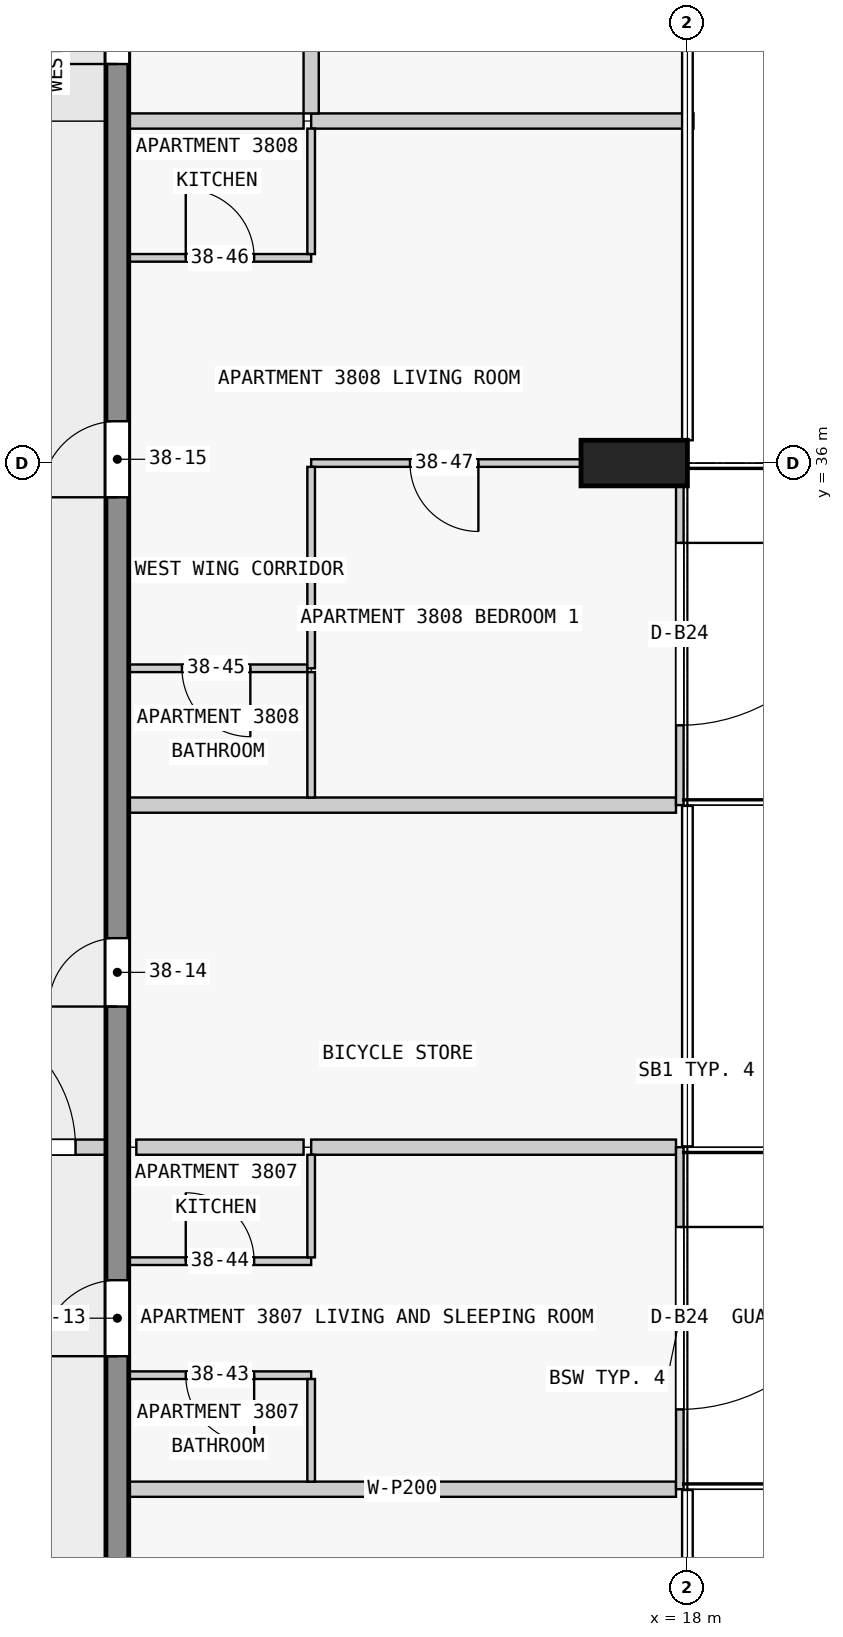
"""IFC4 building model, lengths in metres.
Left out: names, types, materials, properties, quantities, classifications, styles, units other than length and angle.
Written with IfcOpenShell. Run it as: python <this file> out.ifc"""

import sys

from ifc_helpers import new_model, si_unit, direction, frame, frame_2d, origin, origin_2d, place, context, subcontext, project, spatial, rectangle, extrude, element, fill, save


model = new_model("IFC4")
c1 = context("Model", 3, precision=1e-05, world=origin(), true_north=direction((0.0, 1.0)))
c2 = subcontext(c1, "Body", "Model", "MODEL_VIEW")
j1 = project(units=[si_unit("LENGTHUNIT", "METRE"), si_unit("PLANEANGLEUNIT", "RADIAN")], contexts=[c1])
p1 = place(None, origin())
s1 = spatial("IfcSite", under=j1, at=p1, CompositionType="ELEMENT")
p2 = place(p1, origin())
s2 = spatial("IfcBuilding", under=s1, at=p2, CompositionType="ELEMENT")
p3 = place(p2, frame((0.0, 0.0, 149.9)))
s3 = spatial("IfcBuildingStorey", under=s2, at=p3, CompositionType="ELEMENT", Elevation=149.9)
p4 = place(p3, frame((17.3, 36.0, 0.0), z_axis=(0.0, 0.0, 1.0), x_axis=(0.0, 1.0, 0.0)))
e1 = element("IfcColumn", 1, at=p4, inside=s3, PredefinedType="COLUMN", context=c2, shape_type="SweptSolid", body=[
    extrude(rectangle(XDim=0.6, YDim=1.4, at=origin_2d()), origin(), (0.0, 0.0, 1.0), 3.5),
])
p5 = place(p3, frame((10.5, 18.0, 0.0), z_axis=(0.0, 0.0, 1.0), x_axis=(0.0, 1.0, 0.0)))
e2 = element("IfcWall", 2, at=p5, inside=s3, PredefinedType="SHEAR", context=c2, shape_type="SweptSolid", body=[
    extrude(rectangle(XDim=27.0, YDim=0.3, at=frame_2d((13.5, 0.0))), origin(), (0.0, 0.0, 1.0), 3.25),
])
p6 = place(p5, frame((1.85, 0.0, 0.0)))
e3 = element("IfcOpeningElement", 3, at=p6, cuts=e2, PredefinedType="OPENING", context=c2, shape_type="SweptSolid", body=[
    extrude(rectangle(XDim=0.9, YDim=2.1, at=frame_2d((0.45, 1.05))), frame((0.0, 0.16, 0.0), z_axis=(0.0, -1.0, 0.0), x_axis=(1.0, 0.0, 0.0)), (0.0, 0.0, 1.0), 0.32),
])
p7 = place(p5, frame((6.25, 0.0, 0.0)))
e4 = element("IfcOpeningElement", 4, at=p7, cuts=e2, PredefinedType="OPENING", context=c2, shape_type="SweptSolid", body=[
    extrude(rectangle(XDim=1.0, YDim=2.1, at=frame_2d((0.5, 1.05))), frame((0.0, 0.16, 0.0), z_axis=(0.0, -1.0, 0.0), x_axis=(1.0, 0.0, 0.0)), (0.0, 0.0, 1.0), 0.32),
])
p8 = place(p5, frame((10.85, 0.0, 0.0)))
e5 = element("IfcOpeningElement", 5, at=p8, cuts=e2, PredefinedType="OPENING", context=c2, shape_type="SweptSolid", body=[
    extrude(rectangle(XDim=0.9, YDim=2.1, at=frame_2d((0.45, 1.05))), frame((0.0, 0.16, 0.0), z_axis=(0.0, -1.0, 0.0), x_axis=(1.0, 0.0, 0.0)), (0.0, 0.0, 1.0), 0.32),
])
p9 = place(p5, frame((17.55, 0.0, 0.0)))
e6 = element("IfcOpeningElement", 6, at=p9, cuts=e2, PredefinedType="OPENING", context=c2, shape_type="SweptSolid", body=[
    extrude(rectangle(XDim=1.0, YDim=2.1, at=frame_2d((0.5, 1.05))), frame((0.0, 0.16, 0.0), z_axis=(0.0, -1.0, 0.0), x_axis=(1.0, 0.0, 0.0)), (0.0, 0.0, 1.0), 0.32),
])
p10 = place(p5, frame((23.25, 0.0, 0.0)))
e7 = element("IfcOpeningElement", 7, at=p10, cuts=e2, PredefinedType="OPENING", context=c2, shape_type="SweptSolid", body=[
    extrude(rectangle(XDim=0.9, YDim=2.1, at=frame_2d((0.45, 1.05))), frame((0.0, 0.16, 0.0), z_axis=(0.0, -1.0, 0.0), x_axis=(1.0, 0.0, 0.0)), (0.0, 0.0, 1.0), 0.32),
])
p11 = place(p5, frame((25.45, 0.0, 0.0)))
e8 = element("IfcOpeningElement", 8, at=p11, cuts=e2, PredefinedType="OPENING", context=c2, shape_type="SweptSolid", body=[
    extrude(rectangle(XDim=1.0, YDim=2.1, at=frame_2d((0.5, 1.05))), frame((0.0, 0.16, 0.0), z_axis=(0.0, -1.0, 0.0), x_axis=(1.0, 0.0, 0.0)), (0.0, 0.0, 1.0), 0.32),
])
p12 = place(p3, frame((17.9, 27.0, 0.0), z_axis=(0.0, 0.0, 1.0), x_axis=(0.0, -1.0, 0.0)))
e9 = element("IfcWall", 9, at=p12, inside=s3, PredefinedType="STANDARD", context=c2, shape_type="SweptSolid", body=[
    extrude(rectangle(XDim=4.5, YDim=0.1, at=frame_2d((2.25, 0.0))), origin(), (0.0, 0.0, 1.0), 3.25),
])
p13 = place(p12, frame((1.05, 0.0, 0.0)))
e10 = element("IfcOpeningElement", 10, at=p13, cuts=e9, PredefinedType="OPENING", context=c2, shape_type="SweptSolid", body=[
    extrude(rectangle(XDim=2.4, YDim=2.4, at=frame_2d((1.2, 1.2))), frame((0.0, 0.06, 0.0), z_axis=(0.0, -1.0, 0.0), x_axis=(1.0, 0.0, 0.0)), (0.0, 0.0, 1.0), 0.12),
])
p14 = place(p3, frame((17.9, 36.0, 0.0), z_axis=(0.0, 0.0, 1.0), x_axis=(0.0, -1.0, 0.0)))
e11 = element("IfcWall", 11, at=p14, inside=s3, PredefinedType="STANDARD", context=c2, shape_type="SweptSolid", body=[
    extrude(rectangle(XDim=4.5, YDim=0.1, at=frame_2d((2.25, 0.0))), origin(), (0.0, 0.0, 1.0), 3.25),
])
p15 = place(p14, frame((1.05, 0.0, 0.0)))
e12 = element("IfcOpeningElement", 12, at=p15, cuts=e11, PredefinedType="OPENING", context=c2, shape_type="SweptSolid", body=[
    extrude(rectangle(XDim=2.4, YDim=2.4, at=frame_2d((1.2, 1.2))), frame((0.0, 0.06, 0.0), z_axis=(0.0, -1.0, 0.0), x_axis=(1.0, 0.0, 0.0)), (0.0, 0.0, 1.0), 0.12),
])
p16 = place(p3, frame((17.85, 22.5, 0.0), z_axis=(0.0, 0.0, 1.0), x_axis=(-1.0, 0.0, 0.0)))
e13 = element("IfcWall", 13, at=p16, inside=s3, PredefinedType="PARTITIONING", context=c2, shape_type="SweptSolid", body=[
    extrude(rectangle(XDim=7.2, YDim=0.2, at=frame_2d((3.6, 0.0))), origin(), (0.0, 0.0, 1.0), 3.25),
])
p17 = place(p3, frame((13.05, 24.0, 0.0), z_axis=(0.0, 0.0, 1.0), x_axis=(-1.0, 0.0, 0.0)))
e14 = element("IfcWall", 14, at=p17, inside=s3, PredefinedType="PARTITIONING", context=c2, shape_type="SweptSolid", body=[
    extrude(rectangle(XDim=2.4, YDim=0.1, at=frame_2d((1.2, 0.0))), origin(), (0.0, 0.0, 1.0), 3.25),
])
p18 = place(p17, frame((0.75, 0.0, 0.0)))
e15 = element("IfcOpeningElement", 15, at=p18, cuts=e14, PredefinedType="OPENING", context=c2, shape_type="SweptSolid", body=[
    extrude(rectangle(XDim=0.9, YDim=2.1, at=frame_2d((0.45, 1.05))), frame((0.0, 0.06, 0.0), z_axis=(0.0, -1.0, 0.0), x_axis=(1.0, 0.0, 0.0)), (0.0, 0.0, 1.0), 0.12),
])
p19 = place(p3, frame((10.65, 25.5, 0.0), z_axis=(0.0, 0.0, 1.0), x_axis=(1.0, 0.0, 0.0)))
e16 = element("IfcWall", 16, at=p19, inside=s3, PredefinedType="PARTITIONING", context=c2, shape_type="SweptSolid", body=[
    extrude(rectangle(XDim=2.4, YDim=0.1, at=frame_2d((1.2, 0.0))), origin(), (0.0, 0.0, 1.0), 3.25),
])
p20 = place(p19, frame((0.75, 0.0, 0.0)))
e17 = element("IfcOpeningElement", 17, at=p20, cuts=e16, PredefinedType="OPENING", context=c2, shape_type="SweptSolid", body=[
    extrude(rectangle(XDim=0.9, YDim=2.1, at=frame_2d((0.45, 1.05))), frame((0.0, 0.06, 0.0), z_axis=(0.0, -1.0, 0.0), x_axis=(1.0, 0.0, 0.0)), (0.0, 0.0, 1.0), 0.12),
])
p21 = place(p3, frame((12.95, 27.0, 0.0), z_axis=(0.0, 0.0, 1.0), x_axis=(-1.0, 0.0, 0.0)))
e18 = element("IfcWall", 18, at=p21, inside=s3, PredefinedType="PARTITIONING", context=c2, shape_type="SweptSolid", body=[
    extrude(rectangle(XDim=2.2, YDim=0.2, at=frame_2d((1.1, 0.0))), origin(), (0.0, 0.0, 1.0), 3.25),
])
p22 = place(p3, frame((13.05, 27.0, 0.0), z_axis=(0.0, 0.0, 1.0), x_axis=(1.0, 0.0, 0.0)))
e19 = element("IfcWall", 19, at=p22, inside=s3, PredefinedType="PARTITIONING", context=c2, shape_type="SweptSolid", body=[
    extrude(rectangle(XDim=4.8, YDim=0.2, at=frame_2d((2.4, 0.0))), origin(), (0.0, 0.0, 1.0), 3.25),
])
p23 = place(p3, frame((17.85, 31.5, 0.0), z_axis=(0.0, 0.0, 1.0), x_axis=(-1.0, 0.0, 0.0)))
e20 = element("IfcWall", 20, at=p23, inside=s3, PredefinedType="PARTITIONING", context=c2, shape_type="SweptSolid", body=[
    extrude(rectangle(XDim=7.2, YDim=0.2, at=frame_2d((3.6, 0.0))), origin(), (0.0, 0.0, 1.0), 3.25),
])
p24 = place(p3, frame((13.0, 33.3, 0.0), z_axis=(0.0, 0.0, 1.0), x_axis=(-1.0, 0.0, 0.0)))
e21 = element("IfcWall", 21, at=p24, inside=s3, PredefinedType="PARTITIONING", context=c2, shape_type="SweptSolid", body=[
    extrude(rectangle(XDim=2.35, YDim=0.1, at=frame_2d((1.175, 0.0))), origin(), (0.0, 0.0, 1.0), 3.25),
])
p25 = place(p24, frame((0.75, 0.0, 0.0)))
e22 = element("IfcOpeningElement", 22, at=p25, cuts=e21, PredefinedType="OPENING", context=c2, shape_type="SweptSolid", body=[
    extrude(rectangle(XDim=0.9, YDim=2.1, at=frame_2d((0.45, 1.05))), frame((0.0, 0.06, 0.0), z_axis=(0.0, -1.0, 0.0), x_axis=(1.0, 0.0, 0.0)), (0.0, 0.0, 1.0), 0.12),
])
p26 = place(p3, frame((16.6, 36.0, 0.0), z_axis=(0.0, 0.0, 1.0), x_axis=(-1.0, 0.0, 0.0)))
e23 = element("IfcWall", 23, at=p26, inside=s3, PredefinedType="PARTITIONING", context=c2, shape_type="SweptSolid", body=[
    extrude(rectangle(XDim=3.55, YDim=0.1, at=frame_2d((1.775, 0.0))), origin(), (0.0, 0.0, 1.0), 3.25),
])
p27 = place(p26, frame((1.35, 0.0, 0.0)))
e24 = element("IfcOpeningElement", 24, at=p27, cuts=e23, PredefinedType="OPENING", context=c2, shape_type="SweptSolid", body=[
    extrude(rectangle(XDim=0.9, YDim=2.1, at=frame_2d((0.45, 1.05))), frame((0.0, 0.06, 0.0), z_axis=(0.0, -1.0, 0.0), x_axis=(1.0, 0.0, 0.0)), (0.0, 0.0, 1.0), 0.12),
])
p28 = place(p3, frame((10.65, 38.7, 0.0), z_axis=(0.0, 0.0, 1.0), x_axis=(1.0, 0.0, 0.0)))
e25 = element("IfcWall", 25, at=p28, inside=s3, PredefinedType="PARTITIONING", context=c2, shape_type="SweptSolid", body=[
    extrude(rectangle(XDim=2.4, YDim=0.1, at=frame_2d((1.2, 0.0))), origin(), (0.0, 0.0, 1.0), 3.25),
])
p29 = place(p28, frame((0.75, 0.0, 0.0)))
e26 = element("IfcOpeningElement", 26, at=p29, cuts=e25, PredefinedType="OPENING", context=c2, shape_type="SweptSolid", body=[
    extrude(rectangle(XDim=0.9, YDim=2.1, at=frame_2d((0.45, 1.05))), frame((0.0, 0.06, 0.0), z_axis=(0.0, -1.0, 0.0), x_axis=(1.0, 0.0, 0.0)), (0.0, 0.0, 1.0), 0.12),
])
p30 = place(p3, frame((12.95, 40.5, 0.0), z_axis=(0.0, 0.0, 1.0), x_axis=(-1.0, 0.0, 0.0)))
e27 = element("IfcWall", 27, at=p30, inside=s3, PredefinedType="PARTITIONING", context=c2, shape_type="SweptSolid", body=[
    extrude(rectangle(XDim=2.3, YDim=0.2, at=frame_2d((1.15, 0.0))), origin(), (0.0, 0.0, 1.0), 3.25),
])
p31 = place(p3, frame((13.05, 40.5, 0.0), z_axis=(0.0, 0.0, 1.0), x_axis=(1.0, 0.0, 0.0)))
e28 = element("IfcWall", 28, at=p31, inside=s3, PredefinedType="PARTITIONING", context=c2, shape_type="SweptSolid", body=[
    extrude(rectangle(XDim=5.03, YDim=0.2, at=frame_2d((2.515, 0.0))), origin(), (0.0, 0.0, 1.0), 3.25),
])
p32 = place(p3, frame((13.05, 35.95, 0.0), z_axis=(0.0, 0.0, 1.0), x_axis=(0.0, -1.0, 0.0)))
e29 = element("IfcWall", 29, at=p32, inside=s3, PredefinedType="PARTITIONING", context=c2, shape_type="SweptSolid", body=[
    extrude(rectangle(XDim=2.65, YDim=0.1, at=frame_2d((1.325, 0.0))), origin(), (0.0, 0.0, 1.0), 3.25),
])
for number, where, z_axis, x_axis in (
    (30, (13.05, 22.6, 0.0), (0.0, 0.0, 1.0), (0.0, 1.0, 0.0)),
    (31, (13.05, 25.55, 0.0), (0.0, 0.0, 1.0), (0.0, 1.0, 0.0)),
):
    element("IfcWall", number, at=place(p3, frame(where, z_axis=z_axis, x_axis=x_axis)), inside=s3, PredefinedType="PARTITIONING", context=c2, shape_type="SweptSolid", body=[
        extrude(rectangle(XDim=1.35, YDim=0.1, at=frame_2d((0.675, 0.0))), origin(), (0.0, 0.0, 1.0), 3.25),
    ])
for number, where, z_axis, x_axis in (
    (32, (13.05, 31.6, 0.0), (0.0, 0.0, 1.0), (0.0, 1.0, 0.0)),
    (33, (13.05, 38.75, 0.0), (0.0, 0.0, 1.0), (0.0, 1.0, 0.0)),
):
    element("IfcWall", number, at=place(p3, frame(where, z_axis=z_axis, x_axis=x_axis)), inside=s3, PredefinedType="PARTITIONING", context=c2, shape_type="SweptSolid", body=[
        extrude(rectangle(XDim=1.65, YDim=0.1, at=frame_2d((0.825, 0.0))), origin(), (0.0, 0.0, 1.0), 3.25),
    ])
p33 = place(p3, frame((13.05, 40.6, 0.0), z_axis=(0.0, 0.0, 1.0), x_axis=(0.0, 1.0, 0.0)))
e34 = element("IfcWall", 34, at=p33, inside=s3, PredefinedType="PARTITIONING", context=c2, shape_type="SweptSolid", body=[
    extrude(rectangle(XDim=2.2, YDim=0.2, at=frame_2d((1.1, 0.0))), origin(), (0.0, 0.0, 1.0), 3.25),
])
p34 = place(p3, frame((7.45, 27.0, 0.0), z_axis=(0.0, 0.0, 1.0), x_axis=(1.0, 0.0, 0.0)))
e35 = element("IfcWall", 35, at=p34, inside=s3, PredefinedType="PARTITIONING", context=c2, shape_type="SweptSolid", body=[
    extrude(rectangle(XDim=3.2, YDim=0.2, at=frame_2d((1.6, 0.0))), origin(), (0.0, 0.0, 1.0), 3.25),
])
p35 = place(p34, frame((0.7, 0.0, 0.0)))
e36 = element("IfcOpeningElement", 36, at=p35, cuts=e35, PredefinedType="OPENING", context=c2, shape_type="SweptSolid", body=[
    extrude(rectangle(XDim=1.8, YDim=2.1, at=frame_2d((0.9, 1.05))), frame((0.0, 0.11, 0.0), z_axis=(0.0, -1.0, 0.0), x_axis=(1.0, 0.0, 0.0)), (0.0, 0.0, 1.0), 0.22),
])
p36 = place(p13, origin())
e37 = element("IfcDoor", 37, at=p36, inside=s3, OperationType="SINGLE_SWING_LEFT", PredefinedType="DOOR", context=c2, shape_type="SweptSolid", body=[
    extrude(rectangle(XDim=2.4, YDim=2.4, at=frame_2d((1.2, 1.2))), frame((0.0, 0.025, 0.0), z_axis=(0.0, -1.0, 0.0), x_axis=(1.0, 0.0, 0.0)), (0.0, 0.0, 1.0), 0.05),
])
fill(e10, e37)
p37 = place(p15, origin())
e38 = element("IfcDoor", 38, at=p37, inside=s3, OperationType="SINGLE_SWING_LEFT", PredefinedType="DOOR", context=c2, shape_type="SweptSolid", body=[
    extrude(rectangle(XDim=2.4, YDim=2.4, at=frame_2d((1.2, 1.2))), frame((0.0, 0.025, 0.0), z_axis=(0.0, -1.0, 0.0), x_axis=(1.0, 0.0, 0.0)), (0.0, 0.0, 1.0), 0.05),
])
fill(e12, e38)
p38 = place(p7, origin())
e39 = element("IfcDoor", 39, at=p38, inside=s3, OperationType="SINGLE_SWING_LEFT", PredefinedType="DOOR", context=c2, shape_type="SweptSolid", body=[
    extrude(rectangle(XDim=1.0, YDim=2.1, at=frame_2d((0.5, 1.05))), frame((0.0, 0.025, 0.0), z_axis=(0.0, -1.0, 0.0), x_axis=(1.0, 0.0, 0.0)), (0.0, 0.0, 1.0), 0.05),
])
fill(e4, e39)
p39 = place(p8, origin())
e40 = element("IfcDoor", 40, at=p39, inside=s3, OperationType="SINGLE_SWING_LEFT", PredefinedType="DOOR", context=c2, shape_type="SweptSolid", body=[
    extrude(rectangle(XDim=0.9, YDim=2.1, at=frame_2d((0.45, 1.05))), frame((0.0, 0.025, 0.0), z_axis=(0.0, -1.0, 0.0), x_axis=(1.0, 0.0, 0.0)), (0.0, 0.0, 1.0), 0.05),
])
fill(e5, e40)
p40 = place(p9, origin())
e41 = element("IfcDoor", 41, at=p40, inside=s3, OperationType="SINGLE_SWING_RIGHT", PredefinedType="DOOR", context=c2, shape_type="SweptSolid", body=[
    extrude(rectangle(XDim=1.0, YDim=2.1, at=frame_2d((0.5, 1.05))), frame((0.0, 0.025, 0.0), z_axis=(0.0, -1.0, 0.0), x_axis=(1.0, 0.0, 0.0)), (0.0, 0.0, 1.0), 0.05),
])
fill(e6, e41)
p41 = place(p10, origin())
e42 = element("IfcDoor", 42, at=p41, inside=s3, OperationType="SINGLE_SWING_RIGHT", PredefinedType="DOOR", context=c2, shape_type="SweptSolid", body=[
    extrude(rectangle(XDim=0.9, YDim=2.1, at=frame_2d((0.45, 1.05))), frame((0.0, 0.025, 0.0), z_axis=(0.0, -1.0, 0.0), x_axis=(1.0, 0.0, 0.0)), (0.0, 0.0, 1.0), 0.05),
])
fill(e7, e42)
p42 = place(p35, origin())
e43 = element("IfcDoor", 43, at=p42, inside=s3, OperationType="SINGLE_SWING_LEFT", PredefinedType="DOOR", context=c2, shape_type="SweptSolid", body=[
    extrude(rectangle(XDim=1.8, YDim=2.1, at=frame_2d((0.9, 1.05))), frame((0.0, 0.025, 0.0), z_axis=(0.0, -1.0, 0.0), x_axis=(1.0, 0.0, 0.0)), (0.0, 0.0, 1.0), 0.05),
])
fill(e36, e43)
p43 = place(p18, origin())
e44 = element("IfcDoor", 44, at=p43, inside=s3, OperationType="SINGLE_SWING_LEFT", PredefinedType="DOOR", context=c2, shape_type="SweptSolid", body=[
    extrude(rectangle(XDim=0.9, YDim=2.1, at=frame_2d((0.45, 1.05))), frame((0.0, 0.025, 0.0), z_axis=(0.0, -1.0, 0.0), x_axis=(1.0, 0.0, 0.0)), (0.0, 0.0, 1.0), 0.05),
])
fill(e15, e44)
p44 = place(p20, origin())
e45 = element("IfcDoor", 45, at=p44, inside=s3, OperationType="SINGLE_SWING_LEFT", PredefinedType="DOOR", context=c2, shape_type="SweptSolid", body=[
    extrude(rectangle(XDim=0.9, YDim=2.1, at=frame_2d((0.45, 1.05))), frame((0.0, 0.025, 0.0), z_axis=(0.0, -1.0, 0.0), x_axis=(1.0, 0.0, 0.0)), (0.0, 0.0, 1.0), 0.05),
])
fill(e17, e45)
p45 = place(p25, origin())
e46 = element("IfcDoor", 46, at=p45, inside=s3, OperationType="SINGLE_SWING_RIGHT", PredefinedType="DOOR", context=c2, shape_type="SweptSolid", body=[
    extrude(rectangle(XDim=0.9, YDim=2.1, at=frame_2d((0.45, 1.05))), frame((0.0, 0.025, 0.0), z_axis=(0.0, -1.0, 0.0), x_axis=(1.0, 0.0, 0.0)), (0.0, 0.0, 1.0), 0.05),
])
fill(e22, e46)
p46 = place(p29, origin())
e47 = element("IfcDoor", 47, at=p46, inside=s3, OperationType="SINGLE_SWING_LEFT", PredefinedType="DOOR", context=c2, shape_type="SweptSolid", body=[
    extrude(rectangle(XDim=0.9, YDim=2.1, at=frame_2d((0.45, 1.05))), frame((0.0, 0.025, 0.0), z_axis=(0.0, -1.0, 0.0), x_axis=(1.0, 0.0, 0.0)), (0.0, 0.0, 1.0), 0.05),
])
fill(e26, e47)
p47 = place(p27, origin())
e48 = element("IfcDoor", 48, at=p47, inside=s3, OperationType="SINGLE_SWING_RIGHT", PredefinedType="DOOR", context=c2, shape_type="SweptSolid", body=[
    extrude(rectangle(XDim=0.9, YDim=2.1, at=frame_2d((0.45, 1.05))), frame((0.0, 0.025, 0.0), z_axis=(0.0, -1.0, 0.0), x_axis=(1.0, 0.0, 0.0)), (0.0, 0.0, 1.0), 0.05),
])
fill(e24, e48)
save(model, sys.argv[1])
